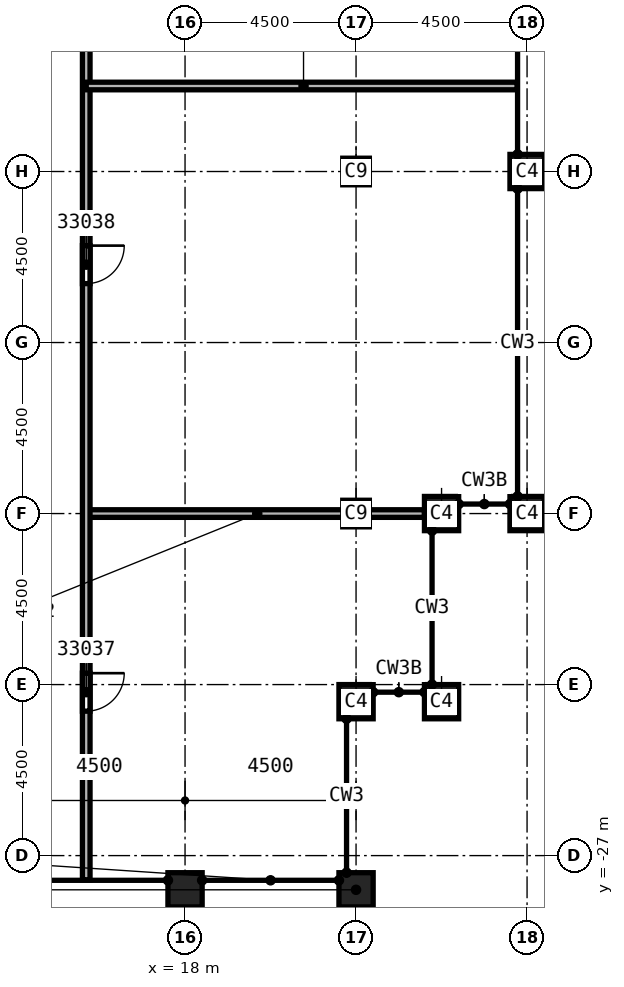
"""IFC4 building model, lengths in metres.
Left out: names, types, materials, properties, quantities, classifications, styles, units other than length and angle.
Written with IfcOpenShell. Run it as: python <this file> out.ifc"""

import sys

from ifc_helpers import new_model, si_unit, direction, frame, frame_2d, origin, origin_2d, place, context, subcontext, project, spatial, rectangle, extrude, element, fill, save


model = new_model("IFC4")
c1 = context("Model", 3, precision=1e-05, world=origin(), true_north=direction((0.0, 1.0)))
c2 = subcontext(c1, "Body", "Model", "MODEL_VIEW")
j1 = project(units=[si_unit("LENGTHUNIT", "METRE"), si_unit("PLANEANGLEUNIT", "RADIAN")], contexts=[c1])
p1 = place(None, origin())
s1 = spatial("IfcSite", under=j1, at=p1, CompositionType="ELEMENT")
p2 = place(p1, origin())
s2 = spatial("IfcBuilding", under=s1, at=p2, CompositionType="ELEMENT")
p3 = place(p2, frame((0.0, 0.0, 361.0)))
s3 = spatial("IfcBuildingStorey", under=s2, at=p3, CompositionType="ELEMENT", Elevation=361.0)
for number, where, z_axis, x_axis in (
    (1, (22.5, -9.0, 0.0), (0.0, 0.0, 1.0), (1.0, 0.0, 0.0)),
    (2, (22.5, -18.0, 0.0), (0.0, 0.0, 1.0), (1.0, 0.0, 0.0)),
):
    element("IfcColumn", number, at=place(p3, frame(where, z_axis=z_axis, x_axis=x_axis)), inside=s3, PredefinedType="COLUMN", context=c2, shape_type="SweptSolid", body=[
        extrude(rectangle(XDim=0.7, YDim=0.7, at=origin_2d()), origin(), (0.0, 0.0, 1.0), 4.6),
    ])
for number, where, z_axis, x_axis in (
    (3, (27.0, -9.0, 0.0), (0.0, 0.0, 1.0), (0.0, 1.0, 0.0)),
    (4, (27.0, -18.0, 0.0), (0.0, 0.0, 1.0), (0.0, 1.0, 0.0)),
    (5, (18.0, -27.9, 0.0), (0.0, 0.0, 1.0), (1.0, 0.0, 0.0)),
    (6, (22.5, -27.9, 0.0), (0.0, 0.0, 1.0), (1.0, 0.0, 0.0)),
    (7, (22.5, -22.95, 0.0), (0.0, 0.0, 1.0), (1.0, 0.0, 0.0)),
    (8, (24.75, -22.95, 0.0), (0.0, 0.0, 1.0), (1.0, 0.0, 0.0)),
    (9, (24.75, -18.0, 0.0), (0.0, 0.0, 1.0), (1.0, 0.0, 0.0)),
):
    element("IfcColumn", number, at=place(p3, frame(where, z_axis=z_axis, x_axis=x_axis)), inside=s3, PredefinedType="COLUMN", context=c2, shape_type="SweptSolid", body=[
        extrude(rectangle(XDim=0.9, YDim=0.9, at=origin_2d()), origin(), (0.0, 0.0, 1.0), 4.6),
    ])
p4 = place(p3, frame((15.4, -18.0, 0.0), z_axis=(0.0, 0.0, 1.0), x_axis=(1.0, 0.0, 0.0)))
e10 = element("IfcWall", 10, at=p4, inside=s3, PredefinedType="PARTITIONING", context=c2, shape_type="SweptSolid", body=[
    extrude(rectangle(XDim=8.9, YDim=0.2, at=frame_2d((4.45, 0.0))), origin(), (0.0, 0.0, 1.0), 4.15),
])
p5 = place(p3, frame((15.4, 27.636, 0.0), z_axis=(0.0, 0.0, 1.0), x_axis=(0.0, -1.0, 0.0)))
e11 = element("IfcWall", 11, at=p5, inside=s3, PredefinedType="PARTITIONING", context=c2, shape_type="SweptSolid", body=[
    extrude(rectangle(XDim=55.272, YDim=0.2, at=frame_2d((27.636, 0.0))), origin(), (0.0, 0.0, 1.0), 4.15),
])
p6 = place(p5, frame((21.036, 0.0, 0.0)))
e12 = element("IfcOpeningElement", 12, at=p6, cuts=e11, PredefinedType="OPENING", context=c2, shape_type="SweptSolid", body=[
    extrude(rectangle(XDim=1.0, YDim=2.1, at=frame_2d((0.5, 1.05))), frame((0.0, 0.1, 0.0), z_axis=(0.0, -1.0, 0.0), x_axis=(1.0, 0.0, 0.0)), (0.0, 0.0, 1.0), 0.2),
])
p7 = place(p5, frame((17.436, 0.0, 0.0)))
e13 = element("IfcOpeningElement", 13, at=p7, cuts=e11, PredefinedType="OPENING", context=c2, shape_type="SweptSolid", body=[
    extrude(rectangle(XDim=1.0, YDim=2.1, at=frame_2d((0.5, 1.05))), frame((0.0, 0.1, 0.0), z_axis=(0.0, -1.0, 0.0), x_axis=(1.0, 0.0, 0.0)), (0.0, 0.0, 1.0), 0.2),
])
p8 = place(p5, frame((5.2, 0.0, 0.0)))
e14 = element("IfcOpeningElement", 14, at=p8, cuts=e11, PredefinedType="OPENING", context=c2, shape_type="SweptSolid", body=[
    extrude(rectangle(XDim=1.0, YDim=2.1, at=frame_2d((0.5, 1.05))), frame((0.0, 0.1, 0.0), z_axis=(0.0, -1.0, 0.0), x_axis=(1.0, 0.0, 0.0)), (0.0, 0.0, 1.0), 0.2),
])
p9 = place(p5, frame((49.836, 0.0, 0.0)))
e15 = element("IfcOpeningElement", 15, at=p9, cuts=e11, PredefinedType="OPENING", context=c2, shape_type="SweptSolid", body=[
    extrude(rectangle(XDim=1.0, YDim=2.1, at=frame_2d((0.5, 1.05))), frame((0.0, 0.1, 0.0), z_axis=(0.0, -1.0, 0.0), x_axis=(1.0, 0.0, 0.0)), (0.0, 0.0, 1.0), 0.2),
])
p10 = place(p5, frame((38.586, 0.0, 0.0)))
e16 = element("IfcOpeningElement", 16, at=p10, cuts=e11, PredefinedType="OPENING", context=c2, shape_type="SweptSolid", body=[
    extrude(rectangle(XDim=1.0, YDim=2.1, at=frame_2d((0.5, 1.05))), frame((0.0, 0.1, 0.0), z_axis=(0.0, -1.0, 0.0), x_axis=(1.0, 0.0, 0.0)), (0.0, 0.0, 1.0), 0.2),
])
p11 = place(p5, frame((31.161, 0.0, 0.0)))
e17 = element("IfcOpeningElement", 17, at=p11, cuts=e11, PredefinedType="OPENING", context=c2, shape_type="SweptSolid", body=[
    extrude(rectangle(XDim=1.0, YDim=2.1, at=frame_2d((0.5, 1.05))), frame((0.0, 0.1, 0.0), z_axis=(0.0, -1.0, 0.0), x_axis=(1.0, 0.0, 0.0)), (0.0, 0.0, 1.0), 0.2),
])
p12 = place(p5, frame((27.786, 0.0, 0.0)))
e18 = element("IfcOpeningElement", 18, at=p12, cuts=e11, PredefinedType="OPENING", context=c2, shape_type="SweptSolid", body=[
    extrude(rectangle(XDim=1.0, YDim=2.1, at=frame_2d((0.5, 1.05))), frame((0.0, 0.1, 0.0), z_axis=(0.0, -1.0, 0.0), x_axis=(1.0, 0.0, 0.0)), (0.0, 0.0, 1.0), 0.2),
])
p13 = place(p3, frame((15.4, -6.75, 0.0), z_axis=(0.0, 0.0, 1.0), x_axis=(1.0, 0.0, 0.0)))
e19 = element("IfcWall", 19, at=p13, inside=s3, PredefinedType="PARTITIONING", context=c2, shape_type="SweptSolid", body=[
    extrude(rectangle(XDim=11.336, YDim=0.2, at=frame_2d((5.668, 0.0))), origin(), (0.0, 0.0, 1.0), 4.15),
])
p14 = place(p9, origin())
e20 = element("IfcDoor", 20, at=p14, inside=s3, OperationType="SINGLE_SWING_RIGHT", PredefinedType="DOOR", context=c2, shape_type="SweptSolid", body=[
    extrude(rectangle(XDim=1.0, YDim=2.1, at=frame_2d((0.5, 1.05))), frame((0.0, 0.025, 0.0), z_axis=(0.0, -1.0, 0.0), x_axis=(1.0, 0.0, 0.0)), (0.0, 0.0, 1.0), 0.05),
])
fill(e15, e20)
p15 = place(p10, origin())
e21 = element("IfcDoor", 21, at=p15, inside=s3, OperationType="SINGLE_SWING_LEFT", PredefinedType="DOOR", context=c2, shape_type="SweptSolid", body=[
    extrude(rectangle(XDim=1.0, YDim=2.1, at=frame_2d((0.5, 1.05))), frame((0.0, 0.025, 0.0), z_axis=(0.0, -1.0, 0.0), x_axis=(1.0, 0.0, 0.0)), (0.0, 0.0, 1.0), 0.05),
])
fill(e16, e21)
save(model, sys.argv[1])
